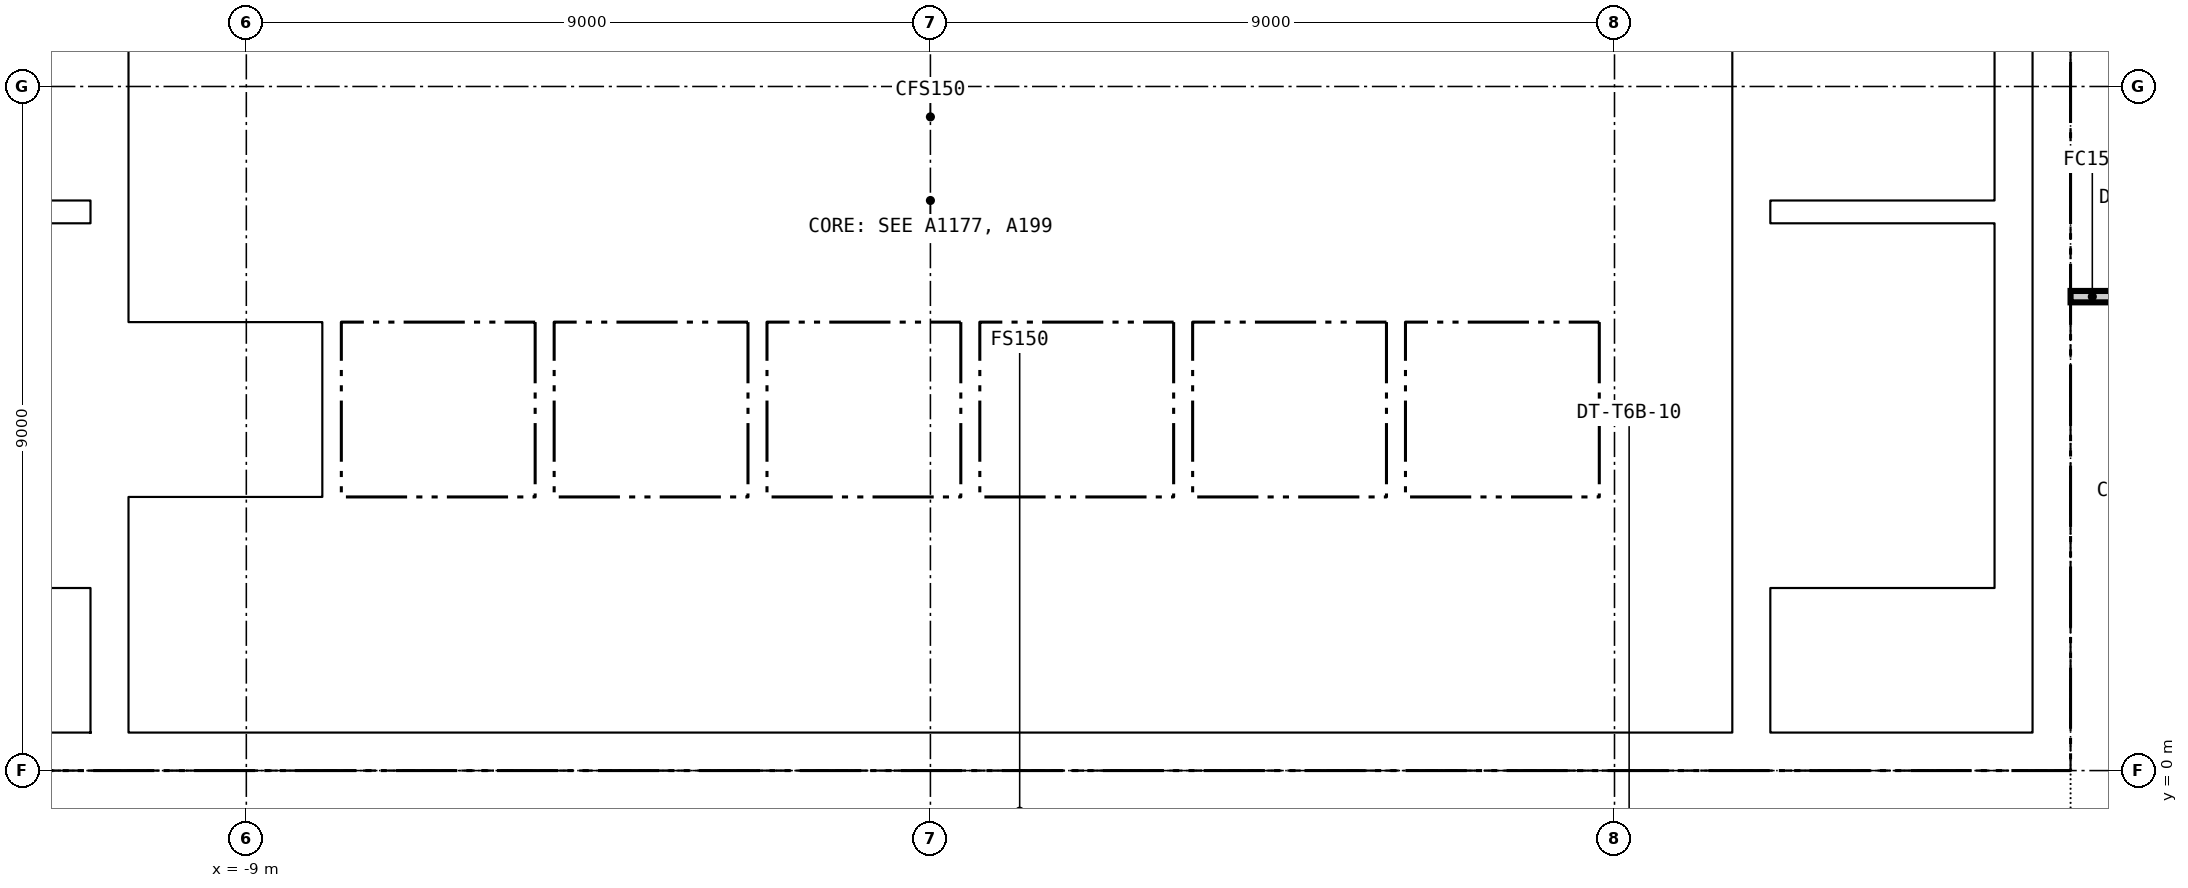
"""IFC4 building model, lengths in metres.
Left out: names, types, materials, properties, quantities, classifications, styles, units other than length and angle.
Written with IfcOpenShell. Run it as: python <this file> out.ifc"""

import sys

from ifc_helpers import new_model, si_unit, direction, frame, frame_2d, origin, place, context, subcontext, project, spatial, rectangle, extrude, element, fill, save


model = new_model("IFC4")
c1 = context("Model", 3, precision=1e-05, world=origin(), true_north=direction((0.0, 1.0)))
c2 = subcontext(c1, "Body", "Model", "MODEL_VIEW")
j1 = project(units=[si_unit("LENGTHUNIT", "METRE"), si_unit("PLANEANGLEUNIT", "RADIAN")], contexts=[c1])
p1 = place(None, origin())
s1 = spatial("IfcSite", under=j1, at=p1, CompositionType="ELEMENT")
p2 = place(p1, origin())
s2 = spatial("IfcBuilding", under=s1, at=p2, CompositionType="ELEMENT")
p3 = place(p2, frame((0.0, 0.0, 271.9)))
s3 = spatial("IfcBuildingStorey", under=s2, at=p3, CompositionType="ELEMENT", Elevation=271.9)
p4 = place(p3, frame((-15.0, 0.25, -0.15), z_axis=(0.0, 0.0, 1.0), x_axis=(1.0, 0.0, 0.0)))
e1 = element("IfcWall", 1, at=p4, inside=s3, PredefinedType="SOLIDWALL", context=c2, shape_type="SweptSolid", body=[
    extrude(rectangle(XDim=30.0, YDim=0.5, at=frame_2d((15.0, 0.0))), origin(), (0.0, 0.0, 1.0), 3.65),
])
p5 = place(p4, frame((5.8, 0.0, 0.15)))
e2 = element("IfcOpeningElement", 2, at=p5, cuts=e1, PredefinedType="OPENING", context=c2, shape_type="SweptSolid", body=[
    extrude(rectangle(XDim=2.4, YDim=2.4, at=frame_2d((1.2, 1.2))), frame((0.0, 0.26, 0.0), z_axis=(0.0, -1.0, 0.0), x_axis=(1.0, 0.0, 0.0)), (0.0, 0.0, 1.0), 0.52),
])
p6 = place(p4, frame((13.8, 0.0, 0.15)))
e3 = element("IfcOpeningElement", 3, at=p6, cuts=e1, PredefinedType="OPENING", context=c2, shape_type="SweptSolid", body=[
    extrude(rectangle(XDim=2.4, YDim=2.4, at=frame_2d((1.2, 1.2))), frame((0.0, 0.26, 0.0), z_axis=(0.0, -1.0, 0.0), x_axis=(1.0, 0.0, 0.0)), (0.0, 0.0, 1.0), 0.52),
])
p7 = place(p4, frame((21.8, 0.0, 0.15)))
e4 = element("IfcOpeningElement", 4, at=p7, cuts=e1, PredefinedType="OPENING", context=c2, shape_type="SweptSolid", body=[
    extrude(rectangle(XDim=2.4, YDim=2.4, at=frame_2d((1.2, 1.2))), frame((0.0, 0.26, 0.0), z_axis=(0.0, -1.0, 0.0), x_axis=(1.0, 0.0, 0.0)), (0.0, 0.0, 1.0), 0.52),
])
p8 = place(p4, frame((1.5, 0.0, 0.15)))
e5 = element("IfcOpeningElement", 5, at=p8, cuts=e1, PredefinedType="OPENING", context=c2, shape_type="SweptSolid", body=[
    extrude(rectangle(XDim=1.2, YDim=2.1, at=frame_2d((0.6, 1.05))), frame((0.0, 0.26, 0.0), z_axis=(0.0, -1.0, 0.0), x_axis=(1.0, 0.0, 0.0)), (0.0, 0.0, 1.0), 0.52),
])
p9 = place(p4, frame((27.3, 0.0, 0.15)))
e6 = element("IfcOpeningElement", 6, at=p9, cuts=e1, PredefinedType="OPENING", context=c2, shape_type="SweptSolid", body=[
    extrude(rectangle(XDim=1.2, YDim=2.1, at=frame_2d((0.6, 1.05))), frame((0.0, 0.26, 0.0), z_axis=(0.0, -1.0, 0.0), x_axis=(1.0, 0.0, 0.0)), (0.0, 0.0, 1.0), 0.52),
])
for number, where, z_axis, x_axis in (
    (7, (14.75, 0.5, -0.15), (0.0, 0.0, 1.0), (0.0, 1.0, 0.0)),
    (8, (-10.8, 0.5, -0.15), (0.0, 0.0, 1.0), (0.0, 1.0, 0.0)),
    (9, (10.8, 0.5, -0.15), (0.0, 0.0, 1.0), (0.0, 1.0, 0.0)),
):
    element("IfcWall", number, at=place(p3, frame(where, z_axis=z_axis, x_axis=x_axis)), inside=s3, PredefinedType="SOLIDWALL", context=c2, shape_type="SweptSolid", body=[
        extrude(rectangle(XDim=14.0, YDim=0.5, at=frame_2d((7.0, 0.0))), origin(), (0.0, 0.0, 1.0), 3.65),
    ])
p10 = place(p3, frame((-10.55, 3.5, 0.0), z_axis=(0.0, 0.0, 1.0), x_axis=(1.0, 0.0, 0.0)))
e10 = element("IfcWall", 10, at=p10, inside=s3, PredefinedType="PARTITIONING", context=c2, shape_type="SweptSolid", body=[
    extrude(rectangle(XDim=21.1, YDim=0.2, at=frame_2d((10.55, 0.0))), origin(), (0.0, 0.0, 1.0), 3.5),
])
p11 = place(p10, frame((0.675, 0.0, 0.0)))
e11 = element("IfcOpeningElement", 11, at=p11, cuts=e10, PredefinedType="OPENING", context=c2, shape_type="SweptSolid", body=[
    extrude(rectangle(XDim=1.2, YDim=2.1, at=frame_2d((0.6, 1.05))), frame((0.0, 0.11, 0.0), z_axis=(0.0, -1.0, 0.0), x_axis=(1.0, 0.0, 0.0)), (0.0, 0.0, 1.0), 0.22),
])
p12 = place(p10, frame((3.475, 0.0, 0.0)))
e12 = element("IfcOpeningElement", 12, at=p12, cuts=e10, PredefinedType="OPENING", context=c2, shape_type="SweptSolid", body=[
    extrude(rectangle(XDim=1.2, YDim=2.1, at=frame_2d((0.6, 1.05))), frame((0.0, 0.11, 0.0), z_axis=(0.0, -1.0, 0.0), x_axis=(1.0, 0.0, 0.0)), (0.0, 0.0, 1.0), 0.22),
])
p13 = place(p10, frame((6.275, 0.0, 0.0)))
e13 = element("IfcOpeningElement", 13, at=p13, cuts=e10, PredefinedType="OPENING", context=c2, shape_type="SweptSolid", body=[
    extrude(rectangle(XDim=1.2, YDim=2.1, at=frame_2d((0.6, 1.05))), frame((0.0, 0.11, 0.0), z_axis=(0.0, -1.0, 0.0), x_axis=(1.0, 0.0, 0.0)), (0.0, 0.0, 1.0), 0.22),
])
p14 = place(p10, frame((9.075, 0.0, 0.0)))
e14 = element("IfcOpeningElement", 14, at=p14, cuts=e10, PredefinedType="OPENING", context=c2, shape_type="SweptSolid", body=[
    extrude(rectangle(XDim=1.2, YDim=2.1, at=frame_2d((0.6, 1.05))), frame((0.0, 0.11, 0.0), z_axis=(0.0, -1.0, 0.0), x_axis=(1.0, 0.0, 0.0)), (0.0, 0.0, 1.0), 0.22),
])
p15 = place(p10, frame((11.875, 0.0, 0.0)))
e15 = element("IfcOpeningElement", 15, at=p15, cuts=e10, PredefinedType="OPENING", context=c2, shape_type="SweptSolid", body=[
    extrude(rectangle(XDim=1.2, YDim=2.1, at=frame_2d((0.6, 1.05))), frame((0.0, 0.11, 0.0), z_axis=(0.0, -1.0, 0.0), x_axis=(1.0, 0.0, 0.0)), (0.0, 0.0, 1.0), 0.22),
])
p16 = place(p10, frame((14.675, 0.0, 0.0)))
e16 = element("IfcOpeningElement", 16, at=p16, cuts=e10, PredefinedType="OPENING", context=c2, shape_type="SweptSolid", body=[
    extrude(rectangle(XDim=1.2, YDim=2.1, at=frame_2d((0.6, 1.05))), frame((0.0, 0.11, 0.0), z_axis=(0.0, -1.0, 0.0), x_axis=(1.0, 0.0, 0.0)), (0.0, 0.0, 1.0), 0.22),
])
p17 = place(p10, frame((17.475, 0.0, 0.0)))
e17 = element("IfcOpeningElement", 17, at=p17, cuts=e10, PredefinedType="OPENING", context=c2, shape_type="SweptSolid", body=[
    extrude(rectangle(XDim=1.2, YDim=2.1, at=frame_2d((0.6, 1.05))), frame((0.0, 0.11, 0.0), z_axis=(0.0, -1.0, 0.0), x_axis=(1.0, 0.0, 0.0)), (0.0, 0.0, 1.0), 0.22),
])
p18 = place(p10, frame((19.9, 0.0, 0.0)))
e18 = element("IfcOpeningElement", 18, at=p18, cuts=e10, PredefinedType="OPENING", context=c2, shape_type="SweptSolid", body=[
    extrude(rectangle(XDim=0.9, YDim=2.1, at=frame_2d((0.45, 1.05))), frame((0.0, 0.11, 0.0), z_axis=(0.0, -1.0, 0.0), x_axis=(1.0, 0.0, 0.0)), (0.0, 0.0, 1.0), 0.22),
])
p19 = place(p3, frame((-10.55, 6.025, 0.0), z_axis=(0.0, 0.0, 1.0), x_axis=(1.0, 0.0, 0.0)))
e19 = element("IfcWall", 19, at=p19, inside=s3, PredefinedType="PARTITIONING", context=c2, shape_type="SweptSolid", body=[
    extrude(rectangle(XDim=21.1, YDim=0.25, at=frame_2d((10.55, 0.0))), origin(), (0.0, 0.0, 1.0), 3.5),
])
p20 = place(p3, frame((-4.125, 8.55, 0.0), z_axis=(0.0, 0.0, 1.0), x_axis=(1.0, 0.0, 0.0)))
e20 = element("IfcWall", 20, at=p20, inside=s3, PredefinedType="PARTITIONING", context=c2, shape_type="SweptSolid", body=[
    extrude(rectangle(XDim=14.675, YDim=0.2, at=frame_2d((7.337, 0.0))), origin(), (0.0, 0.0, 1.0), 3.5),
])
p21 = place(p20, frame((2.438, 0.0, 0.0)))
e21 = element("IfcOpeningElement", 21, at=p21, cuts=e20, PredefinedType="OPENING", context=c2, shape_type="SweptSolid", body=[
    extrude(rectangle(XDim=1.0, YDim=2.1, at=frame_2d((0.5, 1.05))), frame((0.0, 0.11, 0.0), z_axis=(0.0, -1.0, 0.0), x_axis=(1.0, 0.0, 0.0)), (0.0, 0.0, 1.0), 0.22),
])
p22 = place(p20, frame((6.775, 0.0, 0.0)))
e22 = element("IfcOpeningElement", 22, at=p22, cuts=e20, PredefinedType="OPENING", context=c2, shape_type="SweptSolid", body=[
    extrude(rectangle(XDim=1.0, YDim=2.1, at=frame_2d((0.5, 1.05))), frame((0.0, 0.11, 0.0), z_axis=(0.0, -1.0, 0.0), x_axis=(1.0, 0.0, 0.0)), (0.0, 0.0, 1.0), 0.22),
])
p23 = place(p20, frame((10.363, 0.0, 0.0)))
e23 = element("IfcOpeningElement", 23, at=p23, cuts=e20, PredefinedType="OPENING", context=c2, shape_type="SweptSolid", body=[
    extrude(rectangle(XDim=1.0, YDim=2.1, at=frame_2d((0.5, 1.05))), frame((0.0, 0.11, 0.0), z_axis=(0.0, -1.0, 0.0), x_axis=(1.0, 0.0, 0.0)), (0.0, 0.0, 1.0), 0.22),
])
p24 = place(p20, frame((13.475, 0.0, 0.0)))
e24 = element("IfcOpeningElement", 24, at=p24, cuts=e20, PredefinedType="OPENING", context=c2, shape_type="SweptSolid", body=[
    extrude(rectangle(XDim=0.9, YDim=2.1, at=frame_2d((0.45, 1.05))), frame((0.0, 0.11, 0.0), z_axis=(0.0, -1.0, 0.0), x_axis=(1.0, 0.0, 0.0)), (0.0, 0.0, 1.0), 0.22),
])
p25 = place(p3, frame((-4.125, 6.15, 0.0), z_axis=(0.0, 0.0, 1.0), x_axis=(0.0, 1.0, 0.0)))
e25 = element("IfcWall", 25, at=p25, inside=s3, PredefinedType="PARTITIONING", context=c2, shape_type="SweptSolid", body=[
    extrude(rectangle(XDim=4.95, YDim=0.25, at=frame_2d((2.475, 0.0))), origin(), (0.0, 0.0, 1.0), 3.5),
])
p26 = place(p25, frame((3.125, 0.0, 0.0)))
e26 = element("IfcOpeningElement", 26, at=p26, cuts=e25, PredefinedType="OPENING", context=c2, shape_type="SweptSolid", body=[
    extrude(rectangle(XDim=1.2, YDim=2.1, at=frame_2d((0.6, 1.05))), frame((0.0, 0.135, 0.0), z_axis=(0.0, -1.0, 0.0), x_axis=(1.0, 0.0, 0.0)), (0.0, 0.0, 1.0), 0.27),
])
for number, where, z_axis, x_axis in (
    (27, (-7.875, 3.6, 0.0), (0.0, 0.0, 1.0), (0.0, 1.0, 0.0)),
    (28, (-5.075, 3.6, 0.0), (0.0, 0.0, 1.0), (0.0, 1.0, 0.0)),
    (29, (-2.275, 3.6, 0.0), (0.0, 0.0, 1.0), (0.0, 1.0, 0.0)),
    (30, (0.525, 3.6, 0.0), (0.0, 0.0, 1.0), (0.0, 1.0, 0.0)),
    (31, (3.325, 3.6, 0.0), (0.0, 0.0, 1.0), (0.0, 1.0, 0.0)),
    (32, (6.125, 3.6, 0.0), (0.0, 0.0, 1.0), (0.0, 1.0, 0.0)),
    (33, (8.925, 3.6, 0.0), (0.0, 0.0, 1.0), (0.0, 1.0, 0.0)),
):
    element("IfcWall", number, at=place(p3, frame(where, z_axis=z_axis, x_axis=x_axis)), inside=s3, PredefinedType="PARTITIONING", context=c2, shape_type="SweptSolid", body=[
        extrude(rectangle(XDim=2.3, YDim=0.25, at=frame_2d((1.15, 0.0))), origin(), (0.0, 0.0, 1.0), 3.5),
    ])
for number, where, z_axis, x_axis in (
    (34, (1.7, 6.15, 0.0), (0.0, 0.0, 1.0), (0.0, 1.0, 0.0)),
    (35, (4.6, 6.15, 0.0), (0.0, 0.0, 1.0), (0.0, 1.0, 0.0)),
):
    element("IfcWall", number, at=place(p3, frame(where, z_axis=z_axis, x_axis=x_axis)), inside=s3, PredefinedType="PARTITIONING", context=c2, shape_type="SweptSolid", body=[
        extrude(rectangle(XDim=2.3, YDim=0.15, at=frame_2d((1.15, 0.0))), origin(), (0.0, 0.0, 1.0), 3.5),
    ])
p27 = place(p3, frame((8.925, 6.15, 0.0), z_axis=(0.0, 0.0, 1.0), x_axis=(0.0, 1.0, 0.0)))
e36 = element("IfcWall", 36, at=p27, inside=s3, PredefinedType="PARTITIONING", context=c2, shape_type="SweptSolid", body=[
    extrude(rectangle(XDim=2.3, YDim=0.25, at=frame_2d((1.15, 0.0))), origin(), (0.0, 0.0, 1.0), 3.5),
])
for number, where, z_axis, x_axis in (
    (37, (-14.0, 7.35, 0.0), (0.0, 0.0, 1.0), (1.0, 0.0, 0.0)),
    (38, (11.05, 7.35, 0.0), (0.0, 0.0, 1.0), (1.0, 0.0, 0.0)),
):
    element("IfcWall", number, at=place(p3, frame(where, z_axis=z_axis, x_axis=x_axis)), inside=s3, PredefinedType="SOLIDWALL", context=c2, shape_type="SweptSolid", body=[
        extrude(rectangle(XDim=2.95, YDim=0.3, at=frame_2d((1.475, 0.0))), origin(), (0.0, 0.0, 1.0), 3.5),
    ])
p28 = place(p3, frame((14.25, 0.5, 0.0), z_axis=(0.0, 0.0, 1.0), x_axis=(0.0, 1.0, 0.0)))
e39 = element("IfcWall", 39, at=p28, inside=s3, PredefinedType="SOLIDWALL", context=c2, shape_type="SweptSolid", body=[
    extrude(rectangle(XDim=14.0, YDim=0.5, at=frame_2d((7.0, 0.0))), origin(), (0.0, 0.0, 1.0), 3.5),
])
p29 = place(p3, frame((15.0, 6.235, 0.0), z_axis=(0.0, 0.0, 1.0), x_axis=(1.0, 0.0, 0.0)))
e40 = element("IfcWall", 40, at=p29, inside=s3, PredefinedType="PARTITIONING", context=c2, shape_type="SweptSolid", body=[
    extrude(rectangle(XDim=2.125, YDim=0.15, at=frame_2d((1.062, 0.0))), origin(), (0.0, 0.0, 1.0), 2.751),
])
p30 = place(p29, frame((0.613, 0.0, 0.0)))
e41 = element("IfcOpeningElement", 41, at=p30, cuts=e40, PredefinedType="OPENING", context=c2, shape_type="SweptSolid", body=[
    extrude(rectangle(XDim=0.9, YDim=2.1, at=frame_2d((0.45, 1.05))), frame((0.0, 0.085, 0.0), z_axis=(0.0, -1.0, 0.0), x_axis=(1.0, 0.0, 0.0)), (0.0, 0.0, 1.0), 0.17),
])
p31 = place(p26, origin())
e42 = element("IfcDoor", 42, at=p31, inside=s3, OperationType="SINGLE_SWING_LEFT", PredefinedType="DOOR", context=c2, shape_type="SweptSolid", body=[
    extrude(rectangle(XDim=1.2, YDim=2.1, at=frame_2d((0.6, 1.05))), frame((0.0, 0.025, 0.0), z_axis=(0.0, -1.0, 0.0), x_axis=(1.0, 0.0, 0.0)), (0.0, 0.0, 1.0), 0.05),
])
fill(e26, e42)
p32 = place(p11, origin())
e43 = element("IfcDoor", 43, at=p32, inside=s3, OperationType="DOUBLE_DOOR_SLIDING", PredefinedType="DOOR", context=c2, shape_type="SweptSolid", body=[
    extrude(rectangle(XDim=1.2, YDim=2.1, at=frame_2d((0.6, 1.05))), frame((0.0, 0.025, 0.0), z_axis=(0.0, -1.0, 0.0), x_axis=(1.0, 0.0, 0.0)), (0.0, 0.0, 1.0), 0.05),
])
fill(e11, e43)
p33 = place(p12, origin())
e44 = element("IfcDoor", 44, at=p33, inside=s3, OperationType="DOUBLE_DOOR_SLIDING", PredefinedType="DOOR", context=c2, shape_type="SweptSolid", body=[
    extrude(rectangle(XDim=1.2, YDim=2.1, at=frame_2d((0.6, 1.05))), frame((0.0, 0.025, 0.0), z_axis=(0.0, -1.0, 0.0), x_axis=(1.0, 0.0, 0.0)), (0.0, 0.0, 1.0), 0.05),
])
fill(e12, e44)
p34 = place(p13, origin())
e45 = element("IfcDoor", 45, at=p34, inside=s3, OperationType="DOUBLE_DOOR_SLIDING", PredefinedType="DOOR", context=c2, shape_type="SweptSolid", body=[
    extrude(rectangle(XDim=1.2, YDim=2.1, at=frame_2d((0.6, 1.05))), frame((0.0, 0.025, 0.0), z_axis=(0.0, -1.0, 0.0), x_axis=(1.0, 0.0, 0.0)), (0.0, 0.0, 1.0), 0.05),
])
fill(e13, e45)
p35 = place(p14, origin())
e46 = element("IfcDoor", 46, at=p35, inside=s3, OperationType="DOUBLE_DOOR_SLIDING", PredefinedType="DOOR", context=c2, shape_type="SweptSolid", body=[
    extrude(rectangle(XDim=1.2, YDim=2.1, at=frame_2d((0.6, 1.05))), frame((0.0, 0.025, 0.0), z_axis=(0.0, -1.0, 0.0), x_axis=(1.0, 0.0, 0.0)), (0.0, 0.0, 1.0), 0.05),
])
fill(e14, e46)
p36 = place(p15, origin())
e47 = element("IfcDoor", 47, at=p36, inside=s3, OperationType="DOUBLE_DOOR_SLIDING", PredefinedType="DOOR", context=c2, shape_type="SweptSolid", body=[
    extrude(rectangle(XDim=1.2, YDim=2.1, at=frame_2d((0.6, 1.05))), frame((0.0, 0.025, 0.0), z_axis=(0.0, -1.0, 0.0), x_axis=(1.0, 0.0, 0.0)), (0.0, 0.0, 1.0), 0.05),
])
fill(e15, e47)
p37 = place(p16, origin())
e48 = element("IfcDoor", 48, at=p37, inside=s3, OperationType="DOUBLE_DOOR_SLIDING", PredefinedType="DOOR", context=c2, shape_type="SweptSolid", body=[
    extrude(rectangle(XDim=1.2, YDim=2.1, at=frame_2d((0.6, 1.05))), frame((0.0, 0.025, 0.0), z_axis=(0.0, -1.0, 0.0), x_axis=(1.0, 0.0, 0.0)), (0.0, 0.0, 1.0), 0.05),
])
fill(e16, e48)
p38 = place(p17, origin())
e49 = element("IfcDoor", 49, at=p38, inside=s3, OperationType="DOUBLE_DOOR_SLIDING", PredefinedType="DOOR", context=c2, shape_type="SweptSolid", body=[
    extrude(rectangle(XDim=1.2, YDim=2.1, at=frame_2d((0.6, 1.05))), frame((0.0, 0.025, 0.0), z_axis=(0.0, -1.0, 0.0), x_axis=(1.0, 0.0, 0.0)), (0.0, 0.0, 1.0), 0.05),
])
fill(e17, e49)
p39 = place(p18, origin())
e50 = element("IfcDoor", 50, at=p39, inside=s3, OperationType="SINGLE_SWING_RIGHT", PredefinedType="DOOR", context=c2, shape_type="SweptSolid", body=[
    extrude(rectangle(XDim=0.9, YDim=2.1, at=frame_2d((0.45, 1.05))), frame((0.0, 0.025, 0.0), z_axis=(0.0, -1.0, 0.0), x_axis=(1.0, 0.0, 0.0)), (0.0, 0.0, 1.0), 0.05),
])
fill(e18, e50)
p40 = place(p21, origin())
e51 = element("IfcDoor", 51, at=p40, inside=s3, OperationType="SINGLE_SWING_LEFT", PredefinedType="DOOR", context=c2, shape_type="SweptSolid", body=[
    extrude(rectangle(XDim=1.0, YDim=2.1, at=frame_2d((0.5, 1.05))), frame((0.0, 0.025, 0.0), z_axis=(0.0, -1.0, 0.0), x_axis=(1.0, 0.0, 0.0)), (0.0, 0.0, 1.0), 0.05),
])
fill(e21, e51)
p41 = place(p22, origin())
e52 = element("IfcDoor", 52, at=p41, inside=s3, OperationType="SINGLE_SWING_RIGHT", PredefinedType="DOOR", context=c2, shape_type="SweptSolid", body=[
    extrude(rectangle(XDim=1.0, YDim=2.1, at=frame_2d((0.5, 1.05))), frame((0.0, 0.025, 0.0), z_axis=(0.0, -1.0, 0.0), x_axis=(1.0, 0.0, 0.0)), (0.0, 0.0, 1.0), 0.05),
])
fill(e22, e52)
p42 = place(p23, origin())
e53 = element("IfcDoor", 53, at=p42, inside=s3, OperationType="SINGLE_SWING_LEFT", PredefinedType="DOOR", context=c2, shape_type="SweptSolid", body=[
    extrude(rectangle(XDim=1.0, YDim=2.1, at=frame_2d((0.5, 1.05))), frame((0.0, 0.025, 0.0), z_axis=(0.0, -1.0, 0.0), x_axis=(1.0, 0.0, 0.0)), (0.0, 0.0, 1.0), 0.05),
])
fill(e23, e53)
p43 = place(p24, origin())
e54 = element("IfcDoor", 54, at=p43, inside=s3, OperationType="SINGLE_SWING_RIGHT", PredefinedType="DOOR", context=c2, shape_type="SweptSolid", body=[
    extrude(rectangle(XDim=0.9, YDim=2.1, at=frame_2d((0.45, 1.05))), frame((0.0, 0.025, 0.0), z_axis=(0.0, -1.0, 0.0), x_axis=(1.0, 0.0, 0.0)), (0.0, 0.0, 1.0), 0.05),
])
fill(e24, e54)
p44 = place(p5, origin())
e55 = element("IfcDoor", 55, at=p44, inside=s3, OperationType="DOUBLE_DOOR_DOUBLE_SWING", PredefinedType="DOOR", context=c2, shape_type="SweptSolid", body=[
    extrude(rectangle(XDim=2.4, YDim=2.4, at=frame_2d((1.2, 1.2))), frame((0.0, 0.025, 0.0), z_axis=(0.0, -1.0, 0.0), x_axis=(1.0, 0.0, 0.0)), (0.0, 0.0, 1.0), 0.05),
])
fill(e2, e55)
p45 = place(p6, origin())
e56 = element("IfcDoor", 56, at=p45, inside=s3, OperationType="DOUBLE_DOOR_DOUBLE_SWING", PredefinedType="DOOR", context=c2, shape_type="SweptSolid", body=[
    extrude(rectangle(XDim=2.4, YDim=2.4, at=frame_2d((1.2, 1.2))), frame((0.0, 0.025, 0.0), z_axis=(0.0, -1.0, 0.0), x_axis=(1.0, 0.0, 0.0)), (0.0, 0.0, 1.0), 0.05),
])
fill(e3, e56)
p46 = place(p7, origin())
e57 = element("IfcDoor", 57, at=p46, inside=s3, OperationType="DOUBLE_DOOR_DOUBLE_SWING", PredefinedType="DOOR", context=c2, shape_type="SweptSolid", body=[
    extrude(rectangle(XDim=2.4, YDim=2.4, at=frame_2d((1.2, 1.2))), frame((0.0, 0.025, 0.0), z_axis=(0.0, -1.0, 0.0), x_axis=(1.0, 0.0, 0.0)), (0.0, 0.0, 1.0), 0.05),
])
fill(e4, e57)
p47 = place(p9, origin())
e58 = element("IfcDoor", 58, at=p47, inside=s3, OperationType="SINGLE_SWING_RIGHT", PredefinedType="DOOR", context=c2, shape_type="SweptSolid", body=[
    extrude(rectangle(XDim=1.2, YDim=2.1, at=frame_2d((0.6, 1.05))), frame((0.0, 0.025, 0.0), z_axis=(0.0, -1.0, 0.0), x_axis=(1.0, 0.0, 0.0)), (0.0, 0.0, 1.0), 0.05),
])
fill(e6, e58)
save(model, sys.argv[1])
